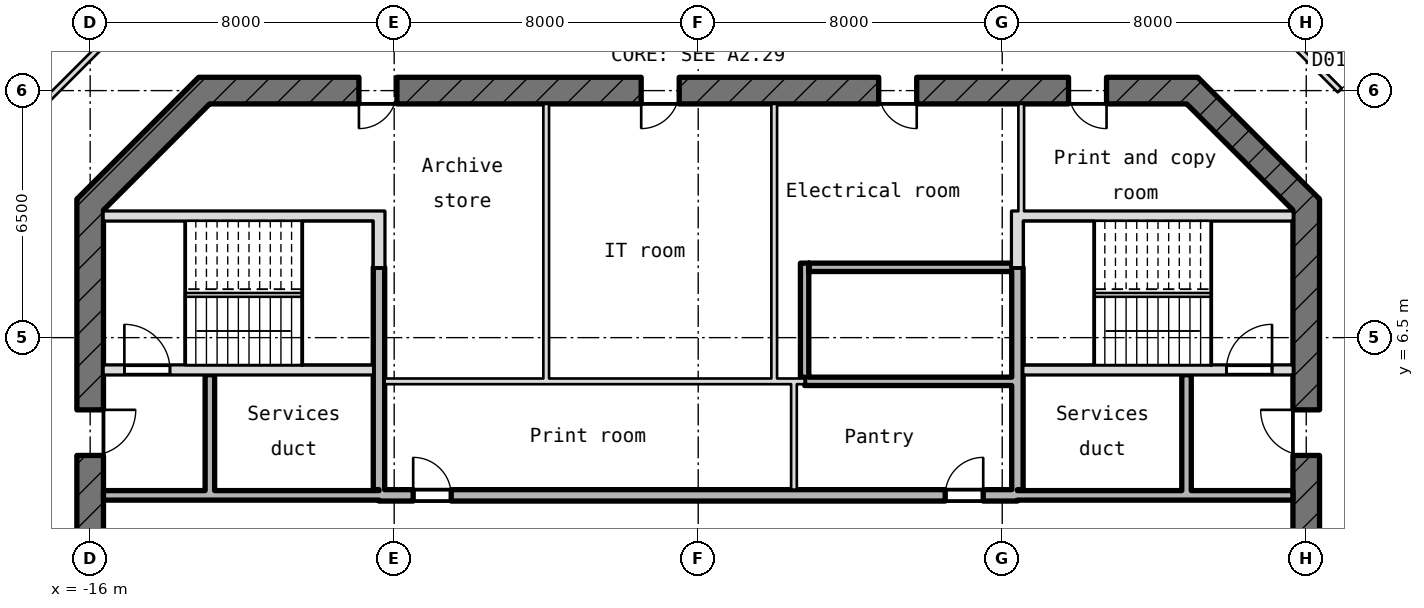
"""IFC4 building model, lengths in metres.
Left out: names, types, materials, properties, quantities, classifications, styles, units other than length and angle.
Written with IfcOpenShell. Run it as: python <this file> out.ifc"""

import sys

from ifc_helpers import new_model, si_unit, direction, frame, frame_2d, origin, place, context, subcontext, project, spatial, rectangle, extrude, element, fill, save


model = new_model("IFC4")
c1 = context("Model", 3, precision=1e-05, world=origin(), true_north=direction((0.0, 1.0)))
c2 = subcontext(c1, "Body", "Model", "MODEL_VIEW")
j1 = project(units=[si_unit("LENGTHUNIT", "METRE"), si_unit("PLANEANGLEUNIT", "RADIAN")], contexts=[c1])
p1 = place(None, origin())
s1 = spatial("IfcSite", under=j1, at=p1, CompositionType="ELEMENT")
p2 = place(p1, origin())
s2 = spatial("IfcBuilding", under=s1, at=p2, CompositionType="ELEMENT")
p3 = place(p2, frame((0.0, 0.0, 309.4)))
s3 = spatial("IfcBuildingStorey", under=s2, at=p3, CompositionType="ELEMENT", Elevation=309.4)
p4 = place(p3, frame((16.0, -10.145, -0.18), z_axis=(0.0, 0.0, 1.0), x_axis=(0.0, 1.0, 0.0)))
e1 = element("IfcWall", 1, at=p4, inside=s3, PredefinedType="SHEAR", context=c2, shape_type="SweptSolid", body=[
    extrude(rectangle(XDim=20.29, YDim=0.7, at=frame_2d((10.145, 0.0))), origin(), (0.0, 0.0, 1.0), 4.15),
])
p5 = place(p4, frame((8.945, 0.0, 0.18)))
e2 = element("IfcOpeningElement", 2, at=p5, cuts=e1, PredefinedType="OPENING", context=c2, shape_type="SweptSolid", body=[
    extrude(rectangle(XDim=2.4, YDim=2.1, at=frame_2d((1.2, 1.05))), frame((0.0, 0.36, 0.0), z_axis=(0.0, -1.0, 0.0), x_axis=(1.0, 0.0, 0.0)), (0.0, 0.0, 1.0), 0.72),
])
p6 = place(p4, frame((13.545, 0.0, 0.18)))
e3 = element("IfcOpeningElement", 3, at=p6, cuts=e1, PredefinedType="OPENING", context=c2, shape_type="SweptSolid", body=[
    extrude(rectangle(XDim=1.2, YDim=2.1, at=frame_2d((0.6, 1.05))), frame((0.0, 0.36, 0.0), z_axis=(0.0, -1.0, 0.0), x_axis=(1.0, 0.0, 0.0)), (0.0, 0.0, 1.0), 0.72),
])
p7 = place(p4, frame((4.745, 0.0, 0.18)))
e4 = element("IfcOpeningElement", 4, at=p7, cuts=e1, PredefinedType="OPENING", context=c2, shape_type="SweptSolid", body=[
    extrude(rectangle(XDim=1.2, YDim=2.1, at=frame_2d((0.6, 1.05))), frame((0.0, 0.36, 0.0), z_axis=(0.0, -1.0, 0.0), x_axis=(1.0, 0.0, 0.0)), (0.0, 0.0, 1.0), 0.72),
])
p8 = place(p3, frame((16.103, 9.897, -0.18), z_axis=(0.0, 0.0, 1.0), x_axis=(-0.707106781187, 0.707106781187, 0.0)))
e5 = element("IfcWall", 5, at=p8, inside=s3, PredefinedType="SHEAR", context=c2, shape_type="SweptSolid", body=[
    extrude(rectangle(XDim=4.533, YDim=0.7, at=frame_2d((2.266, 0.0))), origin(), (0.0, 0.0, 1.0), 4.15),
])
p9 = place(p3, frame((13.145, 13.0, -0.18), z_axis=(0.0, 0.0, 1.0), x_axis=(-1.0, 0.0, 0.0)))
e6 = element("IfcWall", 6, at=p9, inside=s3, PredefinedType="SHEAR", context=c2, shape_type="SweptSolid", body=[
    extrude(rectangle(XDim=26.29, YDim=0.7, at=frame_2d((13.145, 0.0))), origin(), (0.0, 0.0, 1.0), 4.15),
])
p10 = place(p9, frame((21.073, 0.0, 0.18)))
e7 = element("IfcOpeningElement", 7, at=p10, cuts=e6, PredefinedType="OPENING", context=c2, shape_type="SweptSolid", body=[
    extrude(rectangle(XDim=1.0, YDim=2.1, at=frame_2d((0.5, 1.05))), frame((0.0, 0.36, 0.0), z_axis=(0.0, -1.0, 0.0), x_axis=(1.0, 0.0, 0.0)), (0.0, 0.0, 1.0), 0.72),
])
p11 = place(p9, frame((13.645, 0.0, 0.18)))
e8 = element("IfcOpeningElement", 8, at=p11, cuts=e6, PredefinedType="OPENING", context=c2, shape_type="SweptSolid", body=[
    extrude(rectangle(XDim=1.0, YDim=2.1, at=frame_2d((0.5, 1.05))), frame((0.0, 0.36, 0.0), z_axis=(0.0, -1.0, 0.0), x_axis=(1.0, 0.0, 0.0)), (0.0, 0.0, 1.0), 0.72),
])
p12 = place(p9, frame((7.395, 0.0, 0.18)))
e9 = element("IfcOpeningElement", 9, at=p12, cuts=e6, PredefinedType="OPENING", context=c2, shape_type="SweptSolid", body=[
    extrude(rectangle(XDim=1.0, YDim=2.1, at=frame_2d((0.5, 1.05))), frame((0.0, 0.36, 0.0), z_axis=(0.0, -1.0, 0.0), x_axis=(1.0, 0.0, 0.0)), (0.0, 0.0, 1.0), 0.72),
])
p13 = place(p9, frame((2.4, 0.0, 0.18)))
e10 = element("IfcOpeningElement", 10, at=p13, cuts=e6, PredefinedType="OPENING", context=c2, shape_type="SweptSolid", body=[
    extrude(rectangle(XDim=1.0, YDim=2.1, at=frame_2d((0.5, 1.05))), frame((0.0, 0.36, 0.0), z_axis=(0.0, -1.0, 0.0), x_axis=(1.0, 0.0, 0.0)), (0.0, 0.0, 1.0), 0.72),
])
p14 = place(p3, frame((-12.897, 13.103, -0.18), z_axis=(0.0, 0.0, 1.0), x_axis=(-0.707106781187, -0.707106781187, 0.0)))
e11 = element("IfcWall", 11, at=p14, inside=s3, PredefinedType="SHEAR", context=c2, shape_type="SweptSolid", body=[
    extrude(rectangle(XDim=4.533, YDim=0.7, at=frame_2d((2.266, 0.0))), origin(), (0.0, 0.0, 1.0), 4.15),
])
p15 = place(p3, frame((-16.0, 10.145, -0.18), z_axis=(0.0, 0.0, 1.0), x_axis=(0.0, -1.0, 0.0)))
e12 = element("IfcWall", 12, at=p15, inside=s3, PredefinedType="SHEAR", context=c2, shape_type="SweptSolid", body=[
    extrude(rectangle(XDim=20.29, YDim=0.7, at=frame_2d((10.145, 0.0))), origin(), (0.0, 0.0, 1.0), 4.15),
])
p16 = place(p15, frame((8.945, 0.0, 0.18)))
e13 = element("IfcOpeningElement", 13, at=p16, cuts=e12, PredefinedType="OPENING", context=c2, shape_type="SweptSolid", body=[
    extrude(rectangle(XDim=2.4, YDim=2.1, at=frame_2d((1.2, 1.05))), frame((0.0, 0.36, 0.0), z_axis=(0.0, -1.0, 0.0), x_axis=(1.0, 0.0, 0.0)), (0.0, 0.0, 1.0), 0.72),
])
p17 = place(p15, frame((5.545, 0.0, 0.18)))
e14 = element("IfcOpeningElement", 14, at=p17, cuts=e12, PredefinedType="OPENING", context=c2, shape_type="SweptSolid", body=[
    extrude(rectangle(XDim=1.2, YDim=2.1, at=frame_2d((0.6, 1.05))), frame((0.0, 0.36, 0.0), z_axis=(0.0, -1.0, 0.0), x_axis=(1.0, 0.0, 0.0)), (0.0, 0.0, 1.0), 0.72),
])
p18 = place(p3, frame((-15.65, 2.35, 0.0), z_axis=(0.0, 0.0, 1.0), x_axis=(1.0, 0.0, 0.0)))
e15 = element("IfcWall", 15, at=p18, inside=s3, PredefinedType="STANDARD", context=c2, shape_type="SweptSolid", body=[
    extrude(rectangle(XDim=7.25, YDim=0.25, at=frame_2d((3.625, 0.0))), origin(), (0.0, 0.0, 1.0), 3.97),
])
p19 = place(p3, frame((-8.4, 2.35, -0.18), z_axis=(0.0, 0.0, 1.0), x_axis=(1.0, 0.0, 0.0)))
e16 = element("IfcWall", 16, at=p19, inside=s3, PredefinedType="SHEAR", context=c2, shape_type="SweptSolid", body=[
    extrude(rectangle(XDim=16.8, YDim=0.3, at=frame_2d((8.4, 0.0))), origin(), (0.0, 0.0, 1.0), 4.15),
])
p20 = place(p19, frame((0.9, 0.0, 0.18)))
e17 = element("IfcOpeningElement", 17, at=p20, cuts=e16, PredefinedType="OPENING", context=c2, shape_type="SweptSolid", body=[
    extrude(rectangle(XDim=1.0, YDim=2.1, at=frame_2d((0.5, 1.05))), frame((0.0, 0.16, 0.0), z_axis=(0.0, -1.0, 0.0), x_axis=(1.0, 0.0, 0.0)), (0.0, 0.0, 1.0), 0.32),
])
p21 = place(p19, frame((14.9, 0.0, 0.18)))
e18 = element("IfcOpeningElement", 18, at=p21, cuts=e16, PredefinedType="OPENING", context=c2, shape_type="SweptSolid", body=[
    extrude(rectangle(XDim=1.0, YDim=2.1, at=frame_2d((0.5, 1.05))), frame((0.0, 0.16, 0.0), z_axis=(0.0, -1.0, 0.0), x_axis=(1.0, 0.0, 0.0)), (0.0, 0.0, 1.0), 0.32),
])
p22 = place(p3, frame((8.4, 2.35, 0.0), z_axis=(0.0, 0.0, 1.0), x_axis=(1.0, 0.0, 0.0)))
e19 = element("IfcWall", 19, at=p22, inside=s3, PredefinedType="STANDARD", context=c2, shape_type="SweptSolid", body=[
    extrude(rectangle(XDim=7.25, YDim=0.25, at=frame_2d((3.625, 0.0))), origin(), (0.0, 0.0, 1.0), 3.97),
])
p23 = place(p3, frame((-8.25, 5.35, 0.0), z_axis=(0.0, 0.0, 1.0), x_axis=(1.0, 0.0, 0.0)))
e20 = element("IfcWall", 20, at=p23, inside=s3, PredefinedType="PARTITIONING", context=c2, shape_type="SweptSolid", body=[
    extrude(rectangle(XDim=11.05, YDim=0.15, at=frame_2d((5.525, 0.0))), origin(), (0.0, 0.0, 1.0), 3.97),
])
p24 = place(p3, frame((2.8, 5.35, 0.0), z_axis=(0.0, 0.0, 1.0), x_axis=(1.0, 0.0, 0.0)))
e21 = element("IfcWall", 21, at=p24, inside=s3, PredefinedType="STANDARD", context=c2, shape_type="SweptSolid", body=[
    extrude(rectangle(XDim=5.45, YDim=0.22, at=frame_2d((2.725, 0.0))), origin(), (0.0, 0.0, 1.0), 3.97),
])
p25 = place(p3, frame((-15.65, 5.65, -0.18), z_axis=(0.0, 0.0, 1.0), x_axis=(1.0, 0.0, 0.0)))
e22 = element("IfcWall", 22, at=p25, inside=s3, PredefinedType="SHEAR", context=c2, shape_type="SweptSolid", body=[
    extrude(rectangle(XDim=7.1, YDim=0.25, at=frame_2d((3.55, 0.0))), origin(), (0.0, 0.0, 1.0), 4.15),
])
p26 = place(p25, frame((0.55, 0.0, 0.18)))
e23 = element("IfcOpeningElement", 23, at=p26, cuts=e22, PredefinedType="OPENING", context=c2, shape_type="SweptSolid", body=[
    extrude(rectangle(XDim=1.2, YDim=2.1, at=frame_2d((0.6, 1.05))), frame((0.0, 0.135, 0.0), z_axis=(0.0, -1.0, 0.0), x_axis=(1.0, 0.0, 0.0)), (0.0, 0.0, 1.0), 0.27),
])
p27 = place(p3, frame((8.55, 5.65, -0.18), z_axis=(0.0, 0.0, 1.0), x_axis=(1.0, 0.0, 0.0)))
e24 = element("IfcWall", 24, at=p27, inside=s3, PredefinedType="SHEAR", context=c2, shape_type="SweptSolid", body=[
    extrude(rectangle(XDim=7.1, YDim=0.25, at=frame_2d((3.55, 0.0))), origin(), (0.0, 0.0, 1.0), 4.15),
])
p28 = place(p27, frame((5.35, 0.0, 0.18)))
e25 = element("IfcOpeningElement", 25, at=p28, cuts=e24, PredefinedType="OPENING", context=c2, shape_type="SweptSolid", body=[
    extrude(rectangle(XDim=1.2, YDim=2.1, at=frame_2d((0.6, 1.05))), frame((0.0, 0.135, 0.0), z_axis=(0.0, -1.0, 0.0), x_axis=(1.0, 0.0, 0.0)), (0.0, 0.0, 1.0), 0.27),
])
p29 = place(p3, frame((2.91, 8.35, 0.0), z_axis=(0.0, 0.0, 1.0), x_axis=(1.0, 0.0, 0.0)))
e26 = element("IfcWall", 26, at=p29, inside=s3, PredefinedType="STANDARD", context=c2, shape_type="SweptSolid", body=[
    extrude(rectangle(XDim=5.34, YDim=0.22, at=frame_2d((2.67, 0.0))), origin(), (0.0, 0.0, 1.0), 3.97),
])
for number, where, z_axis, x_axis in (
    (27, (-15.65, 9.7, -0.18), (0.0, 0.0, 1.0), (1.0, 0.0, 0.0)),
    (28, (8.55, 9.7, -0.18), (0.0, 0.0, 1.0), (1.0, 0.0, 0.0)),
):
    element("IfcWall", number, at=place(p3, frame(where, z_axis=z_axis, x_axis=x_axis)), inside=s3, PredefinedType="SHEAR", context=c2, shape_type="SweptSolid", body=[
        extrude(rectangle(XDim=7.1, YDim=0.25, at=frame_2d((3.55, 0.0))), origin(), (0.0, 0.0, 1.0), 4.15),
    ])
p30 = place(p3, frame((-12.85, 2.475, 0.0), z_axis=(0.0, 0.0, 1.0), x_axis=(0.0, 1.0, 0.0)))
e29 = element("IfcWall", 29, at=p30, inside=s3, PredefinedType="STANDARD", context=c2, shape_type="SweptSolid", body=[
    extrude(rectangle(XDim=3.05, YDim=0.25, at=frame_2d((1.525, 0.0))), origin(), (0.0, 0.0, 1.0), 3.97),
])
p31 = place(p3, frame((-8.4, 2.5, -0.18), z_axis=(0.0, 0.0, 1.0), x_axis=(0.0, 1.0, 0.0)))
e30 = element("IfcWall", 30, at=p31, inside=s3, PredefinedType="SHEAR", context=c2, shape_type="SweptSolid", body=[
    extrude(rectangle(XDim=5.85, YDim=0.3, at=frame_2d((2.925, 0.0))), origin(), (0.0, 0.0, 1.0), 4.15),
])
p32 = place(p3, frame((-8.4, 8.35, -0.18), z_axis=(0.0, 0.0, 1.0), x_axis=(0.0, 1.0, 0.0)))
e31 = element("IfcWall", 31, at=p32, inside=s3, PredefinedType="SHEAR", context=c2, shape_type="SweptSolid", body=[
    extrude(rectangle(XDim=1.475, YDim=0.3, at=frame_2d((0.737, 0.0))), origin(), (0.0, 0.0, 1.0), 4.15),
])
for number, where, z_axis, x_axis in (
    (32, (-4.0, 5.425, 0.0), (0.0, 0.0, 1.0), (0.0, 1.0, 0.0)),
    (33, (2.0, 5.425, 0.0), (0.0, 0.0, 1.0), (0.0, 1.0, 0.0)),
):
    element("IfcWall", number, at=place(p3, frame(where, z_axis=z_axis, x_axis=x_axis)), inside=s3, PredefinedType="PARTITIONING", context=c2, shape_type="SweptSolid", body=[
        extrude(rectangle(XDim=7.225, YDim=0.15, at=frame_2d((3.612, 0.0))), origin(), (0.0, 0.0, 1.0), 3.97),
    ])
p33 = place(p3, frame((2.52, 2.5, 0.0), z_axis=(0.0, 0.0, 1.0), x_axis=(0.0, 1.0, 0.0)))
e34 = element("IfcWall", 34, at=p33, inside=s3, PredefinedType="PARTITIONING", context=c2, shape_type="SweptSolid", body=[
    extrude(rectangle(XDim=2.775, YDim=0.15, at=frame_2d((1.387, 0.0))), origin(), (0.0, 0.0, 1.0), 3.97),
])
p34 = place(p3, frame((2.8, 5.46, 0.0), z_axis=(0.0, 0.0, 1.0), x_axis=(0.0, 1.0, 0.0)))
e35 = element("IfcWall", 35, at=p34, inside=s3, PredefinedType="STANDARD", context=c2, shape_type="SweptSolid", body=[
    extrude(rectangle(XDim=3.0, YDim=0.22, at=frame_2d((1.5, 0.0))), origin(), (0.0, 0.0, 1.0), 3.97),
])
p35 = place(p3, frame((8.4, 2.5, -0.18), z_axis=(0.0, 0.0, 1.0), x_axis=(0.0, 1.0, 0.0)))
e36 = element("IfcWall", 36, at=p35, inside=s3, PredefinedType="SHEAR", context=c2, shape_type="SweptSolid", body=[
    extrude(rectangle(XDim=5.85, YDim=0.3, at=frame_2d((2.925, 0.0))), origin(), (0.0, 0.0, 1.0), 4.15),
])
p36 = place(p3, frame((8.4, 8.35, -0.18), z_axis=(0.0, 0.0, 1.0), x_axis=(0.0, 1.0, 0.0)))
e37 = element("IfcWall", 37, at=p36, inside=s3, PredefinedType="SHEAR", context=c2, shape_type="SweptSolid", body=[
    extrude(rectangle(XDim=1.475, YDim=0.3, at=frame_2d((0.737, 0.0))), origin(), (0.0, 0.0, 1.0), 4.15),
])
p37 = place(p3, frame((8.5, 9.825, 0.0), z_axis=(0.0, 0.0, 1.0), x_axis=(0.0, 1.0, 0.0)))
e38 = element("IfcWall", 38, at=p37, inside=s3, PredefinedType="PARTITIONING", context=c2, shape_type="SweptSolid", body=[
    extrude(rectangle(XDim=2.825, YDim=0.15, at=frame_2d((1.413, 0.0))), origin(), (0.0, 0.0, 1.0), 3.97),
])
p38 = place(p3, frame((12.85, 2.475, 0.0), z_axis=(0.0, 0.0, 1.0), x_axis=(0.0, 1.0, 0.0)))
e39 = element("IfcWall", 39, at=p38, inside=s3, PredefinedType="STANDARD", context=c2, shape_type="SweptSolid", body=[
    extrude(rectangle(XDim=3.05, YDim=0.25, at=frame_2d((1.525, 0.0))), origin(), (0.0, 0.0, 1.0), 3.97),
])
p39 = place(p3, frame((-18.75, 11.139, 0.0), z_axis=(0.0, 0.0, 1.0), x_axis=(0.707106781187, 0.707106781187, 0.0)))
e40 = element("IfcWall", 40, at=p39, inside=s3, PredefinedType="PARTITIONING", context=c2, shape_type="SweptSolid", body=[
    extrude(rectangle(XDim=6.521, YDim=0.15, at=frame_2d((3.26, 0.0))), origin(), (0.0, 0.0, 1.0), 3.97),
])
p40 = place(p3, frame((14.139, 15.75, 0.0), z_axis=(0.0, 0.0, 1.0), x_axis=(0.707106781187, -0.707106781187, 0.0)))
e41 = element("IfcWall", 41, at=p40, inside=s3, PredefinedType="PARTITIONING", context=c2, shape_type="SweptSolid", body=[
    extrude(rectangle(XDim=6.521, YDim=0.15, at=frame_2d((3.26, 0.0))), origin(), (0.0, 0.0, 1.0), 3.97),
])
p41 = place(p40, frame((3.878, 0.0, 0.0)))
e42 = element("IfcOpeningElement", 42, at=p41, cuts=e41, PredefinedType="OPENING", context=c2, shape_type="SweptSolid", body=[
    extrude(rectangle(XDim=0.95, YDim=2.1, at=frame_2d((0.475, 1.05))), frame((0.0, 0.085, 0.0), z_axis=(0.0, -1.0, 0.0), x_axis=(1.0, 0.0, 0.0)), (0.0, 0.0, 1.0), 0.17),
])
p42 = place(p26, origin())
e43 = element("IfcDoor", 43, at=p42, inside=s3, OperationType="SINGLE_SWING_RIGHT", PredefinedType="DOOR", context=c2, shape_type="SweptSolid", body=[
    extrude(rectangle(XDim=1.2, YDim=2.1, at=frame_2d((0.6, 1.05))), frame((0.0, 0.025, 0.0), z_axis=(0.0, -1.0, 0.0), x_axis=(1.0, 0.0, 0.0)), (0.0, 0.0, 1.0), 0.05),
])
fill(e23, e43)
p43 = place(p28, origin())
e44 = element("IfcDoor", 44, at=p43, inside=s3, OperationType="SINGLE_SWING_RIGHT", PredefinedType="DOOR", context=c2, shape_type="SweptSolid", body=[
    extrude(rectangle(XDim=1.2, YDim=2.1, at=frame_2d((0.6, 1.05))), frame((0.0, 0.025, 0.0), z_axis=(0.0, -1.0, 0.0), x_axis=(1.0, 0.0, 0.0)), (0.0, 0.0, 1.0), 0.05),
])
fill(e25, e44)
p44 = place(p17, origin())
e45 = element("IfcDoor", 45, at=p44, inside=s3, OperationType="SINGLE_SWING_RIGHT", PredefinedType="DOOR", context=c2, shape_type="SweptSolid", body=[
    extrude(rectangle(XDim=1.2, YDim=2.1, at=frame_2d((0.6, 1.05))), frame((0.0, 0.025, 0.0), z_axis=(0.0, -1.0, 0.0), x_axis=(1.0, 0.0, 0.0)), (0.0, 0.0, 1.0), 0.05),
])
fill(e14, e45)
p45 = place(p6, origin())
e46 = element("IfcDoor", 46, at=p45, inside=s3, OperationType="SINGLE_SWING_RIGHT", PredefinedType="DOOR", context=c2, shape_type="SweptSolid", body=[
    extrude(rectangle(XDim=1.2, YDim=2.1, at=frame_2d((0.6, 1.05))), frame((0.0, 0.025, 0.0), z_axis=(0.0, -1.0, 0.0), x_axis=(1.0, 0.0, 0.0)), (0.0, 0.0, 1.0), 0.05),
])
fill(e3, e46)
p46 = place(p20, origin())
e47 = element("IfcDoor", 47, at=p46, inside=s3, OperationType="SINGLE_SWING_RIGHT", PredefinedType="DOOR", context=c2, shape_type="SweptSolid", body=[
    extrude(rectangle(XDim=1.0, YDim=2.1, at=frame_2d((0.5, 1.05))), frame((0.0, 0.025, 0.0), z_axis=(0.0, -1.0, 0.0), x_axis=(1.0, 0.0, 0.0)), (0.0, 0.0, 1.0), 0.05),
])
fill(e17, e47)
p47 = place(p21, origin())
e48 = element("IfcDoor", 48, at=p47, inside=s3, OperationType="SINGLE_SWING_RIGHT", PredefinedType="DOOR", context=c2, shape_type="SweptSolid", body=[
    extrude(rectangle(XDim=1.0, YDim=2.1, at=frame_2d((0.5, 1.05))), frame((0.0, 0.025, 0.0), z_axis=(0.0, -1.0, 0.0), x_axis=(1.0, 0.0, 0.0)), (0.0, 0.0, 1.0), 0.05),
])
fill(e18, e48)
p48 = place(p10, origin())
e49 = element("IfcDoor", 49, at=p48, inside=s3, OperationType="SINGLE_SWING_RIGHT", PredefinedType="DOOR", context=c2, shape_type="SweptSolid", body=[
    extrude(rectangle(XDim=1.0, YDim=2.1, at=frame_2d((0.5, 1.05))), frame((0.0, 0.025, 0.0), z_axis=(0.0, -1.0, 0.0), x_axis=(1.0, 0.0, 0.0)), (0.0, 0.0, 1.0), 0.05),
])
fill(e7, e49)
p49 = place(p11, origin())
e50 = element("IfcDoor", 50, at=p49, inside=s3, OperationType="SINGLE_SWING_RIGHT", PredefinedType="DOOR", context=c2, shape_type="SweptSolid", body=[
    extrude(rectangle(XDim=1.0, YDim=2.1, at=frame_2d((0.5, 1.05))), frame((0.0, 0.025, 0.0), z_axis=(0.0, -1.0, 0.0), x_axis=(1.0, 0.0, 0.0)), (0.0, 0.0, 1.0), 0.05),
])
fill(e8, e50)
p50 = place(p12, origin())
e51 = element("IfcDoor", 51, at=p50, inside=s3, OperationType="SINGLE_SWING_RIGHT", PredefinedType="DOOR", context=c2, shape_type="SweptSolid", body=[
    extrude(rectangle(XDim=1.0, YDim=2.1, at=frame_2d((0.5, 1.05))), frame((0.0, 0.025, 0.0), z_axis=(0.0, -1.0, 0.0), x_axis=(1.0, 0.0, 0.0)), (0.0, 0.0, 1.0), 0.05),
])
fill(e9, e51)
p51 = place(p13, origin())
e52 = element("IfcDoor", 52, at=p51, inside=s3, OperationType="SINGLE_SWING_RIGHT", PredefinedType="DOOR", context=c2, shape_type="SweptSolid", body=[
    extrude(rectangle(XDim=1.0, YDim=2.1, at=frame_2d((0.5, 1.05))), frame((0.0, 0.025, 0.0), z_axis=(0.0, -1.0, 0.0), x_axis=(1.0, 0.0, 0.0)), (0.0, 0.0, 1.0), 0.05),
])
fill(e10, e52)
p52 = place(p41, origin())
e53 = element("IfcDoor", 53, at=p52, inside=s3, OperationType="SINGLE_SWING_RIGHT", PredefinedType="DOOR", context=c2, shape_type="SweptSolid", body=[
    extrude(rectangle(XDim=0.95, YDim=2.1, at=frame_2d((0.475, 1.05))), frame((0.0, 0.025, 0.0), z_axis=(0.0, -1.0, 0.0), x_axis=(1.0, 0.0, 0.0)), (0.0, 0.0, 1.0), 0.05),
])
fill(e42, e53)
save(model, sys.argv[1])
